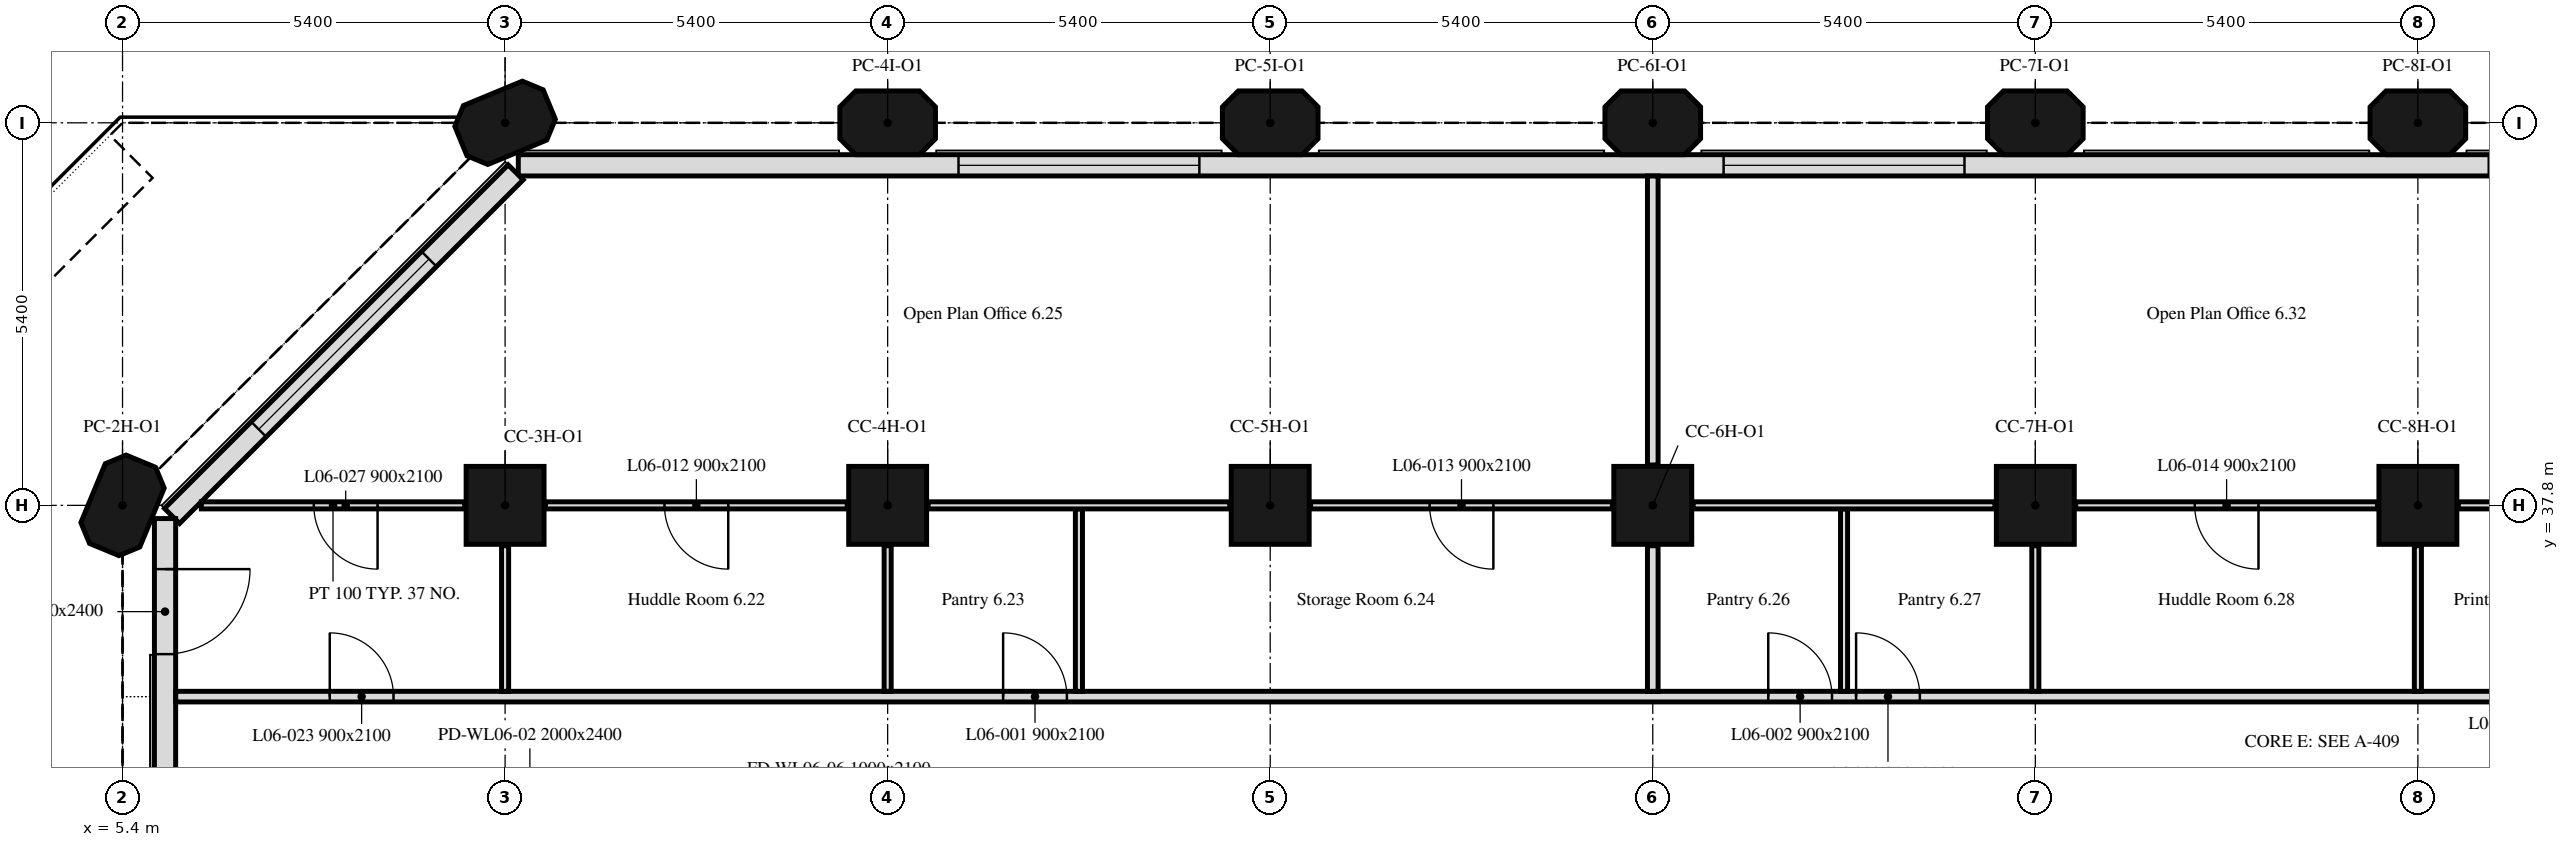
"""IFC4 building model, lengths in metres.
Left out: names, types, materials, properties, quantities, classifications, styles, units other than length and angle.
Written with IfcOpenShell. Run it as: python <this file> out.ifc"""

import sys

from ifc_helpers import new_model, si_unit, direction, frame, frame_2d, origin, origin_2d, place, context, subcontext, project, spatial, polyline, rectangle, outline, extrude, element, fill, save


model = new_model("IFC4")
c1 = context("Model", 3, precision=1e-05, world=origin(), true_north=direction((0.0, 1.0)))
c2 = subcontext(c1, "Body", "Model", "MODEL_VIEW")
j1 = project(units=[si_unit("LENGTHUNIT", "METRE"), si_unit("PLANEANGLEUNIT", "RADIAN")], contexts=[c1])
p1 = place(None, origin())
s1 = spatial("IfcSite", under=j1, at=p1, CompositionType="ELEMENT")
p2 = place(p1, origin())
s2 = spatial("IfcBuilding", under=s1, at=p2, CompositionType="ELEMENT")
p3 = place(p2, frame((0.0, 0.0, 33.6)))
s3 = spatial("IfcBuildingStorey", under=s2, at=p3, CompositionType="ELEMENT", Elevation=33.6)
p4 = place(p3, frame((5.4, 37.8, 0.0), z_axis=(0.0, 0.0, 1.0), x_axis=(0.382683432365, 0.923879532511, 0.0)))
e1 = element("IfcColumn", 1, at=p4, inside=s3, PredefinedType="COLUMN", context=c2, shape_type="SweptSolid", body=[
    extrude(outline(polyline([(-0.45, -0.45), (0.45, -0.45), (0.675, -0.225), (0.675, 0.225), (0.45, 0.45), (-0.45, 0.45), (-0.675, 0.225), (-0.675, -0.225), (-0.45, -0.45)])), origin(), (0.0, 0.0, 1.0), 3.5),
])
for number, where, z_axis, x_axis in (
    (2, (10.8, 37.8, 0.0), (0.0, 0.0, 1.0), (1.0, 0.0, 0.0)),
    (3, (16.2, 37.8, 0.0), (0.0, 0.0, 1.0), (1.0, 0.0, 0.0)),
    (4, (21.6, 37.8, 0.0), (0.0, 0.0, 1.0), (1.0, 0.0, 0.0)),
    (5, (27.0, 37.8, 0.0), (0.0, 0.0, 1.0), (1.0, 0.0, 0.0)),
    (6, (32.4, 37.8, 0.0), (0.0, 0.0, 1.0), (1.0, 0.0, 0.0)),
    (7, (37.8, 37.8, 0.0), (0.0, 0.0, 1.0), (1.0, 0.0, 0.0)),
):
    element("IfcColumn", number, at=place(p3, frame(where, z_axis=z_axis, x_axis=x_axis)), inside=s3, PredefinedType="COLUMN", context=c2, shape_type="SweptSolid", body=[
        extrude(rectangle(XDim=1.1, YDim=1.1, at=origin_2d()), origin(), (0.0, 0.0, 1.0), 3.5),
    ])
for number, where, z_axis, x_axis in (
    (8, (10.8, 43.2, 0.0), (0.0, 0.0, 1.0), (0.924, 0.383, 0.0)),
    (9, (16.2, 43.2, 0.0), (0.0, 0.0, 1.0), (1.0, 0.0, 0.0)),
    (10, (21.6, 43.2, 0.0), (0.0, 0.0, 1.0), (1.0, 0.0, 0.0)),
    (11, (27.0, 43.2, 0.0), (0.0, 0.0, 1.0), (1.0, 0.0, 0.0)),
    (12, (32.4, 43.2, 0.0), (0.0, 0.0, 1.0), (1.0, 0.0, 0.0)),
    (13, (37.8, 43.2, 0.0), (0.0, 0.0, 1.0), (1.0, 0.0, 0.0)),
):
    element("IfcColumn", number, at=place(p3, frame(where, z_axis=z_axis, x_axis=x_axis)), inside=s3, PredefinedType="COLUMN", context=c2, shape_type="SweptSolid", body=[
        extrude(outline(polyline([(-0.45, -0.45), (0.45, -0.45), (0.675, -0.225), (0.675, 0.225), (0.45, 0.45), (-0.45, 0.45), (-0.675, 0.225), (-0.675, -0.225), (-0.45, -0.45)])), origin(), (0.0, 0.0, 1.0), 3.5),
    ])
p5 = place(p3, frame((43.014, 42.6, 0.0), z_axis=(0.0, 0.0, 1.0), x_axis=(-1.0, 0.0, 0.0)))
e14 = element("IfcWall", 14, at=p5, inside=s3, PredefinedType="SOLIDWALL", context=c2, shape_type="SweptSolid", body=[
    extrude(rectangle(XDim=32.027, YDim=0.3, at=frame_2d((16.014, 0.0))), origin(), (0.0, 0.0, 1.0), 3.5),
])
p6 = place(p5, frame((0.814, 0.0, 0.9)))
e15 = element("IfcOpeningElement", 15, at=p6, cuts=e14, PredefinedType="OPENING", context=c2, shape_type="SweptSolid", body=[
    extrude(rectangle(XDim=3.4, YDim=1.7, at=frame_2d((1.7, 0.85))), frame((0.0, 0.16, 0.0), z_axis=(0.0, -1.0, 0.0), x_axis=(1.0, 0.0, 0.0)), (0.0, 0.0, 1.0), 0.32),
])
p7 = place(p5, frame((11.614, 0.0, 0.9)))
e16 = element("IfcOpeningElement", 16, at=p7, cuts=e14, PredefinedType="OPENING", context=c2, shape_type="SweptSolid", body=[
    extrude(rectangle(XDim=3.4, YDim=1.7, at=frame_2d((1.7, 0.85))), frame((0.0, 0.16, 0.0), z_axis=(0.0, -1.0, 0.0), x_axis=(1.0, 0.0, 0.0)), (0.0, 0.0, 1.0), 0.32),
])
p8 = place(p5, frame((22.414, 0.0, 0.9)))
e17 = element("IfcOpeningElement", 17, at=p8, cuts=e14, PredefinedType="OPENING", context=c2, shape_type="SweptSolid", body=[
    extrude(rectangle(XDim=3.4, YDim=1.7, at=frame_2d((1.7, 0.85))), frame((0.0, 0.16, 0.0), z_axis=(0.0, -1.0, 0.0), x_axis=(1.0, 0.0, 0.0)), (0.0, 0.0, 1.0), 0.32),
])
p9 = place(p3, frame((10.949, 42.501, 0.0), z_axis=(0.0, 0.0, 1.0), x_axis=(-0.707106781187, -0.707106781187, 0.0)))
e18 = element("IfcWall", 18, at=p9, inside=s3, PredefinedType="SOLIDWALL", context=c2, shape_type="SweptSolid", body=[
    extrude(rectangle(XDim=6.86, YDim=0.3, at=frame_2d((3.43, 0.0))), origin(), (0.0, 0.0, 1.0), 3.5),
])
p10 = place(p9, frame((1.73, 0.0, 0.9)))
e19 = element("IfcOpeningElement", 19, at=p10, cuts=e18, PredefinedType="OPENING", context=c2, shape_type="SweptSolid", body=[
    extrude(rectangle(XDim=3.4, YDim=1.7, at=frame_2d((1.7, 0.85))), frame((0.0, 0.16, 0.0), z_axis=(0.0, -1.0, 0.0), x_axis=(1.0, 0.0, 0.0)), (0.0, 0.0, 1.0), 0.32),
])
p11 = place(p3, frame((6.0, 37.614, 0.0), z_axis=(0.0, 0.0, 1.0), x_axis=(0.0, -1.0, 0.0)))
e20 = element("IfcWall", 20, at=p11, inside=s3, PredefinedType="SOLIDWALL", context=c2, shape_type="SweptSolid", body=[
    extrude(rectangle(XDim=5.214, YDim=0.3, at=frame_2d((2.607, 0.0))), origin(), (0.0, 0.0, 1.0), 3.5),
])
p12 = place(p11, frame((0.714, 0.0, 0.0)))
e21 = element("IfcOpeningElement", 21, at=p12, cuts=e20, PredefinedType="OPENING", context=c2, shape_type="SweptSolid", body=[
    extrude(rectangle(XDim=1.2, YDim=2.4, at=frame_2d((0.6, 1.2))), frame((0.0, 0.16, 0.0), z_axis=(0.0, -1.0, 0.0), x_axis=(1.0, 0.0, 0.0)), (0.0, 0.0, 1.0), 0.32),
])
p13 = place(p3, frame((6.151, 35.1, 0.0), z_axis=(0.0, 0.0, 1.0), x_axis=(1.0, 0.0, 0.0)))
e22 = element("IfcWall", 22, at=p13, inside=s3, PredefinedType="PARTITIONING", context=c2, shape_type="SweptSolid", body=[
    extrude(rectangle(XDim=41.698, YDim=0.15, at=frame_2d((20.849, 0.0))), origin(), (0.0, 0.0, 1.0), 3.5),
])
p14 = place(p13, frame((11.679, 0.0, 0.0)))
e23 = element("IfcOpeningElement", 23, at=p14, cuts=e22, PredefinedType="OPENING", context=c2, shape_type="SweptSolid", body=[
    extrude(rectangle(XDim=0.9, YDim=2.1, at=frame_2d((0.45, 1.05))), frame((0.0, 0.075, 0.0), z_axis=(0.0, -1.0, 0.0), x_axis=(1.0, 0.0, 0.0)), (0.0, 0.0, 1.0), 0.15),
])
p15 = place(p13, frame((22.479, 0.0, 0.0)))
e24 = element("IfcOpeningElement", 24, at=p15, cuts=e22, PredefinedType="OPENING", context=c2, shape_type="SweptSolid", body=[
    extrude(rectangle(XDim=0.9, YDim=2.1, at=frame_2d((0.45, 1.05))), frame((0.0, 0.075, 0.0), z_axis=(0.0, -1.0, 0.0), x_axis=(1.0, 0.0, 0.0)), (0.0, 0.0, 1.0), 0.15),
])
p16 = place(p13, frame((23.719, 0.0, 0.0)))
e25 = element("IfcOpeningElement", 25, at=p16, cuts=e22, PredefinedType="OPENING", context=c2, shape_type="SweptSolid", body=[
    extrude(rectangle(XDim=0.9, YDim=2.1, at=frame_2d((0.45, 1.05))), frame((0.0, 0.075, 0.0), z_axis=(0.0, -1.0, 0.0), x_axis=(1.0, 0.0, 0.0)), (0.0, 0.0, 1.0), 0.15),
])
p17 = place(p13, frame((33.279, 0.0, 0.0)))
e26 = element("IfcOpeningElement", 26, at=p17, cuts=e22, PredefinedType="OPENING", context=c2, shape_type="SweptSolid", body=[
    extrude(rectangle(XDim=0.9, YDim=2.1, at=frame_2d((0.45, 1.05))), frame((0.0, 0.075, 0.0), z_axis=(0.0, -1.0, 0.0), x_axis=(1.0, 0.0, 0.0)), (0.0, 0.0, 1.0), 0.15),
])
p18 = place(p13, frame((2.174, 0.0, 0.0)))
e27 = element("IfcOpeningElement", 27, at=p18, cuts=e22, PredefinedType="OPENING", context=c2, shape_type="SweptSolid", body=[
    extrude(rectangle(XDim=0.9, YDim=2.1, at=frame_2d((0.45, 1.05))), frame((0.0, 0.075, 0.0), z_axis=(0.0, -1.0, 0.0), x_axis=(1.0, 0.0, 0.0)), (0.0, 0.0, 1.0), 0.15),
])
p19 = place(p13, frame((34.519, 0.0, 0.0)))
e28 = element("IfcOpeningElement", 28, at=p19, cuts=e22, PredefinedType="OPENING", context=c2, shape_type="SweptSolid", body=[
    extrude(rectangle(XDim=0.9, YDim=2.1, at=frame_2d((0.45, 1.05))), frame((0.0, 0.075, 0.0), z_axis=(0.0, -1.0, 0.0), x_axis=(1.0, 0.0, 0.0)), (0.0, 0.0, 1.0), 0.15),
])
p20 = place(p3, frame((10.23, 37.8, 0.0), z_axis=(0.0, 0.0, 1.0), x_axis=(-1.0, 0.0, 0.0)))
e29 = element("IfcWall", 29, at=p20, inside=s3, PredefinedType="PARTITIONING", context=c2, shape_type="SweptSolid", body=[
    extrude(rectangle(XDim=3.718, YDim=0.1, at=frame_2d((1.859, 0.0))), origin(), (0.0, 0.0, 1.0), 3.5),
])
p21 = place(p20, frame((1.23, 0.0, 0.0)))
e30 = element("IfcOpeningElement", 30, at=p21, cuts=e29, PredefinedType="OPENING", context=c2, shape_type="SweptSolid", body=[
    extrude(rectangle(XDim=0.9, YDim=2.1, at=frame_2d((0.45, 1.05))), frame((0.0, 0.05, 0.0), z_axis=(0.0, -1.0, 0.0), x_axis=(1.0, 0.0, 0.0)), (0.0, 0.0, 1.0), 0.1),
])
for number, where, z_axis, x_axis in (
    (31, (10.8, 35.175, 0.0), (0.0, 0.0, 1.0), (0.0, 1.0, 0.0)),
    (32, (16.2, 35.175, 0.0), (0.0, 0.0, 1.0), (0.0, 1.0, 0.0)),
):
    element("IfcWall", number, at=place(p3, frame(where, z_axis=z_axis, x_axis=x_axis)), inside=s3, PredefinedType="PARTITIONING", context=c2, shape_type="SweptSolid", body=[
        extrude(rectangle(XDim=2.055, YDim=0.1, at=frame_2d((1.027, 0.0))), origin(), (0.0, 0.0, 1.0), 3.5),
    ])
p22 = place(p3, frame((15.63, 37.8, 0.0), z_axis=(0.0, 0.0, 1.0), x_axis=(-1.0, 0.0, 0.0)))
e33 = element("IfcWall", 33, at=p22, inside=s3, PredefinedType="PARTITIONING", context=c2, shape_type="SweptSolid", body=[
    extrude(rectangle(XDim=4.26, YDim=0.1, at=frame_2d((2.13, 0.0))), origin(), (0.0, 0.0, 1.0), 3.5),
])
p23 = place(p22, frame((1.68, 0.0, 0.0)))
e34 = element("IfcOpeningElement", 34, at=p23, cuts=e33, PredefinedType="OPENING", context=c2, shape_type="SweptSolid", body=[
    extrude(rectangle(XDim=0.9, YDim=2.1, at=frame_2d((0.45, 1.05))), frame((0.0, 0.05, 0.0), z_axis=(0.0, -1.0, 0.0), x_axis=(1.0, 0.0, 0.0)), (0.0, 0.0, 1.0), 0.1),
])
p24 = place(p3, frame((18.9, 35.175, 0.0), z_axis=(0.0, 0.0, 1.0), x_axis=(0.0, 1.0, 0.0)))
e35 = element("IfcWall", 35, at=p24, inside=s3, PredefinedType="PARTITIONING", context=c2, shape_type="SweptSolid", body=[
    extrude(rectangle(XDim=2.575, YDim=0.1, at=frame_2d((1.288, 0.0))), origin(), (0.0, 0.0, 1.0), 3.5),
])
p25 = place(p3, frame((27.0, 35.175, 0.0), z_axis=(0.0, 0.0, 1.0), x_axis=(0.0, 1.0, 0.0)))
e36 = element("IfcWall", 36, at=p25, inside=s3, PredefinedType="PARTITIONING", context=c2, shape_type="SweptSolid", body=[
    extrude(rectangle(XDim=2.055, YDim=0.15, at=frame_2d((1.027, 0.0))), origin(), (0.0, 0.0, 1.0), 3.5),
])
p26 = place(p3, frame((26.43, 37.8, 0.0), z_axis=(0.0, 0.0, 1.0), x_axis=(-1.0, 0.0, 0.0)))
e37 = element("IfcWall", 37, at=p26, inside=s3, PredefinedType="PARTITIONING", context=c2, shape_type="SweptSolid", body=[
    extrude(rectangle(XDim=4.26, YDim=0.1, at=frame_2d((2.13, 0.0))), origin(), (0.0, 0.0, 1.0), 3.5),
])
p27 = place(p26, frame((1.68, 0.0, 0.0)))
e38 = element("IfcOpeningElement", 38, at=p27, cuts=e37, PredefinedType="OPENING", context=c2, shape_type="SweptSolid", body=[
    extrude(rectangle(XDim=0.9, YDim=2.1, at=frame_2d((0.45, 1.05))), frame((0.0, 0.05, 0.0), z_axis=(0.0, -1.0, 0.0), x_axis=(1.0, 0.0, 0.0)), (0.0, 0.0, 1.0), 0.1),
])
p28 = place(p3, frame((21.03, 37.8, 0.0), z_axis=(0.0, 0.0, 1.0), x_axis=(-1.0, 0.0, 0.0)))
e39 = element("IfcWall", 39, at=p28, inside=s3, PredefinedType="PARTITIONING", context=c2, shape_type="SweptSolid", body=[
    extrude(rectangle(XDim=4.26, YDim=0.1, at=frame_2d((2.13, 0.0))), origin(), (0.0, 0.0, 1.0), 3.5),
])
p29 = place(p3, frame((27.0, 38.37, 0.0), z_axis=(0.0, 0.0, 1.0), x_axis=(0.0, 1.0, 0.0)))
e40 = element("IfcWall", 40, at=p29, inside=s3, PredefinedType="PARTITIONING", context=c2, shape_type="SweptSolid", body=[
    extrude(rectangle(XDim=4.079, YDim=0.15, at=frame_2d((2.04, 0.0))), origin(), (0.0, 0.0, 1.0), 3.5),
])
p30 = place(p3, frame((29.7, 35.175, 0.0), z_axis=(0.0, 0.0, 1.0), x_axis=(0.0, 1.0, 0.0)))
e41 = element("IfcWall", 41, at=p30, inside=s3, PredefinedType="PARTITIONING", context=c2, shape_type="SweptSolid", body=[
    extrude(rectangle(XDim=2.575, YDim=0.1, at=frame_2d((1.288, 0.0))), origin(), (0.0, 0.0, 1.0), 3.5),
])
p31 = place(p3, frame((32.4, 35.175, 0.0), z_axis=(0.0, 0.0, 1.0), x_axis=(0.0, 1.0, 0.0)))
e42 = element("IfcWall", 42, at=p31, inside=s3, PredefinedType="PARTITIONING", context=c2, shape_type="SweptSolid", body=[
    extrude(rectangle(XDim=2.055, YDim=0.1, at=frame_2d((1.027, 0.0))), origin(), (0.0, 0.0, 1.0), 3.5),
])
p32 = place(p3, frame((31.83, 37.8, 0.0), z_axis=(0.0, 0.0, 1.0), x_axis=(-1.0, 0.0, 0.0)))
e43 = element("IfcWall", 43, at=p32, inside=s3, PredefinedType="PARTITIONING", context=c2, shape_type="SweptSolid", body=[
    extrude(rectangle(XDim=4.26, YDim=0.1, at=frame_2d((2.13, 0.0))), origin(), (0.0, 0.0, 1.0), 3.5),
])
p33 = place(p3, frame((37.8, 35.175, 0.0), z_axis=(0.0, 0.0, 1.0), x_axis=(0.0, 1.0, 0.0)))
e44 = element("IfcWall", 44, at=p33, inside=s3, PredefinedType="PARTITIONING", context=c2, shape_type="SweptSolid", body=[
    extrude(rectangle(XDim=2.055, YDim=0.1, at=frame_2d((1.027, 0.0))), origin(), (0.0, 0.0, 1.0), 3.5),
])
p34 = place(p3, frame((37.23, 37.8, 0.0), z_axis=(0.0, 0.0, 1.0), x_axis=(-1.0, 0.0, 0.0)))
e45 = element("IfcWall", 45, at=p34, inside=s3, PredefinedType="PARTITIONING", context=c2, shape_type="SweptSolid", body=[
    extrude(rectangle(XDim=4.26, YDim=0.1, at=frame_2d((2.13, 0.0))), origin(), (0.0, 0.0, 1.0), 3.5),
])
p35 = place(p34, frame((1.68, 0.0, 0.0)))
e46 = element("IfcOpeningElement", 46, at=p35, cuts=e45, PredefinedType="OPENING", context=c2, shape_type="SweptSolid", body=[
    extrude(rectangle(XDim=0.9, YDim=2.1, at=frame_2d((0.45, 1.05))), frame((0.0, 0.05, 0.0), z_axis=(0.0, -1.0, 0.0), x_axis=(1.0, 0.0, 0.0)), (0.0, 0.0, 1.0), 0.1),
])
p36 = place(p3, frame((42.63, 37.8, 0.0), z_axis=(0.0, 0.0, 1.0), x_axis=(-1.0, 0.0, 0.0)))
e47 = element("IfcWall", 47, at=p36, inside=s3, PredefinedType="PARTITIONING", context=c2, shape_type="SweptSolid", body=[
    extrude(rectangle(XDim=4.26, YDim=0.1, at=frame_2d((2.13, 0.0))), origin(), (0.0, 0.0, 1.0), 3.5),
])
p37 = place(p36, frame((1.06, 0.0, 0.0)))
e48 = element("IfcOpeningElement", 48, at=p37, cuts=e47, PredefinedType="OPENING", context=c2, shape_type="SweptSolid", body=[
    extrude(rectangle(XDim=0.9, YDim=2.1, at=frame_2d((0.45, 1.05))), frame((0.0, 0.05, 0.0), z_axis=(0.0, -1.0, 0.0), x_axis=(1.0, 0.0, 0.0)), (0.0, 0.0, 1.0), 0.1),
])
p38 = place(p12, origin())
e49 = element("IfcDoor", 49, at=p38, inside=s3, OperationType="SINGLE_SWING_LEFT", PredefinedType="DOOR", context=c2, shape_type="SweptSolid", body=[
    extrude(rectangle(XDim=1.2, YDim=2.4, at=frame_2d((0.6, 1.2))), frame((0.0, 0.025, 0.0), z_axis=(0.0, -1.0, 0.0), x_axis=(1.0, 0.0, 0.0)), (0.0, 0.0, 1.0), 0.05),
])
fill(e21, e49)
p39 = place(p7, origin())
e50 = element("IfcWindow", 50, at=p39, inside=s3, PartitioningType="SINGLE_PANEL", PredefinedType="WINDOW", context=c2, shape_type="SweptSolid", body=[
    extrude(rectangle(XDim=3.4, YDim=1.7, at=frame_2d((1.7, 0.85))), frame((0.0, 0.03, 0.0), z_axis=(0.0, -1.0, 0.0), x_axis=(1.0, 0.0, 0.0)), (0.0, 0.0, 1.0), 0.06),
])
fill(e16, e50)
p40 = place(p8, origin())
e51 = element("IfcWindow", 51, at=p40, inside=s3, PartitioningType="SINGLE_PANEL", PredefinedType="WINDOW", context=c2, shape_type="SweptSolid", body=[
    extrude(rectangle(XDim=3.4, YDim=1.7, at=frame_2d((1.7, 0.85))), frame((0.0, 0.03, 0.0), z_axis=(0.0, -1.0, 0.0), x_axis=(1.0, 0.0, 0.0)), (0.0, 0.0, 1.0), 0.06),
])
fill(e17, e51)
p41 = place(p10, origin())
e52 = element("IfcWindow", 52, at=p41, inside=s3, PartitioningType="SINGLE_PANEL", PredefinedType="WINDOW", context=c2, shape_type="SweptSolid", body=[
    extrude(rectangle(XDim=3.4, YDim=1.7, at=frame_2d((1.7, 0.85))), frame((0.0, 0.03, 0.0), z_axis=(0.0, -1.0, 0.0), x_axis=(1.0, 0.0, 0.0)), (0.0, 0.0, 1.0), 0.06),
])
fill(e19, e52)
p42 = place(p14, origin())
e53 = element("IfcDoor", 53, at=p42, inside=s3, OperationType="SINGLE_SWING_RIGHT", PredefinedType="DOOR", context=c2, shape_type="SweptSolid", body=[
    extrude(rectangle(XDim=0.9, YDim=2.1, at=frame_2d((0.45, 1.05))), frame((0.0, 0.025, 0.0), z_axis=(0.0, -1.0, 0.0), x_axis=(1.0, 0.0, 0.0)), (0.0, 0.0, 1.0), 0.05),
])
fill(e23, e53)
p43 = place(p15, origin())
e54 = element("IfcDoor", 54, at=p43, inside=s3, OperationType="SINGLE_SWING_RIGHT", PredefinedType="DOOR", context=c2, shape_type="SweptSolid", body=[
    extrude(rectangle(XDim=0.9, YDim=2.1, at=frame_2d((0.45, 1.05))), frame((0.0, 0.025, 0.0), z_axis=(0.0, -1.0, 0.0), x_axis=(1.0, 0.0, 0.0)), (0.0, 0.0, 1.0), 0.05),
])
fill(e24, e54)
p44 = place(p16, origin())
e55 = element("IfcDoor", 55, at=p44, inside=s3, OperationType="SINGLE_SWING_RIGHT", PredefinedType="DOOR", context=c2, shape_type="SweptSolid", body=[
    extrude(rectangle(XDim=0.9, YDim=2.1, at=frame_2d((0.45, 1.05))), frame((0.0, 0.025, 0.0), z_axis=(0.0, -1.0, 0.0), x_axis=(1.0, 0.0, 0.0)), (0.0, 0.0, 1.0), 0.05),
])
fill(e25, e55)
p45 = place(p23, origin())
e56 = element("IfcDoor", 56, at=p45, inside=s3, OperationType="SINGLE_SWING_LEFT", PredefinedType="DOOR", context=c2, shape_type="SweptSolid", body=[
    extrude(rectangle(XDim=0.9, YDim=2.1, at=frame_2d((0.45, 1.05))), frame((0.0, 0.025, 0.0), z_axis=(0.0, -1.0, 0.0), x_axis=(1.0, 0.0, 0.0)), (0.0, 0.0, 1.0), 0.05),
])
fill(e34, e56)
p46 = place(p27, origin())
e57 = element("IfcDoor", 57, at=p46, inside=s3, OperationType="SINGLE_SWING_RIGHT", PredefinedType="DOOR", context=c2, shape_type="SweptSolid", body=[
    extrude(rectangle(XDim=0.9, YDim=2.1, at=frame_2d((0.45, 1.05))), frame((0.0, 0.025, 0.0), z_axis=(0.0, -1.0, 0.0), x_axis=(1.0, 0.0, 0.0)), (0.0, 0.0, 1.0), 0.05),
])
fill(e38, e57)
p47 = place(p35, origin())
e58 = element("IfcDoor", 58, at=p47, inside=s3, OperationType="SINGLE_SWING_RIGHT", PredefinedType="DOOR", context=c2, shape_type="SweptSolid", body=[
    extrude(rectangle(XDim=0.9, YDim=2.1, at=frame_2d((0.45, 1.05))), frame((0.0, 0.025, 0.0), z_axis=(0.0, -1.0, 0.0), x_axis=(1.0, 0.0, 0.0)), (0.0, 0.0, 1.0), 0.05),
])
fill(e46, e58)
p48 = place(p18, origin())
e59 = element("IfcDoor", 59, at=p48, inside=s3, OperationType="SINGLE_SWING_RIGHT", PredefinedType="DOOR", context=c2, shape_type="SweptSolid", body=[
    extrude(rectangle(XDim=0.9, YDim=2.1, at=frame_2d((0.45, 1.05))), frame((0.0, 0.025, 0.0), z_axis=(0.0, -1.0, 0.0), x_axis=(1.0, 0.0, 0.0)), (0.0, 0.0, 1.0), 0.05),
])
fill(e27, e59)
p49 = place(p21, origin())
e60 = element("IfcDoor", 60, at=p49, inside=s3, OperationType="SINGLE_SWING_RIGHT", PredefinedType="DOOR", context=c2, shape_type="SweptSolid", body=[
    extrude(rectangle(XDim=0.9, YDim=2.1, at=frame_2d((0.45, 1.05))), frame((0.0, 0.025, 0.0), z_axis=(0.0, -1.0, 0.0), x_axis=(1.0, 0.0, 0.0)), (0.0, 0.0, 1.0), 0.05),
])
fill(e30, e60)
save(model, sys.argv[1])
